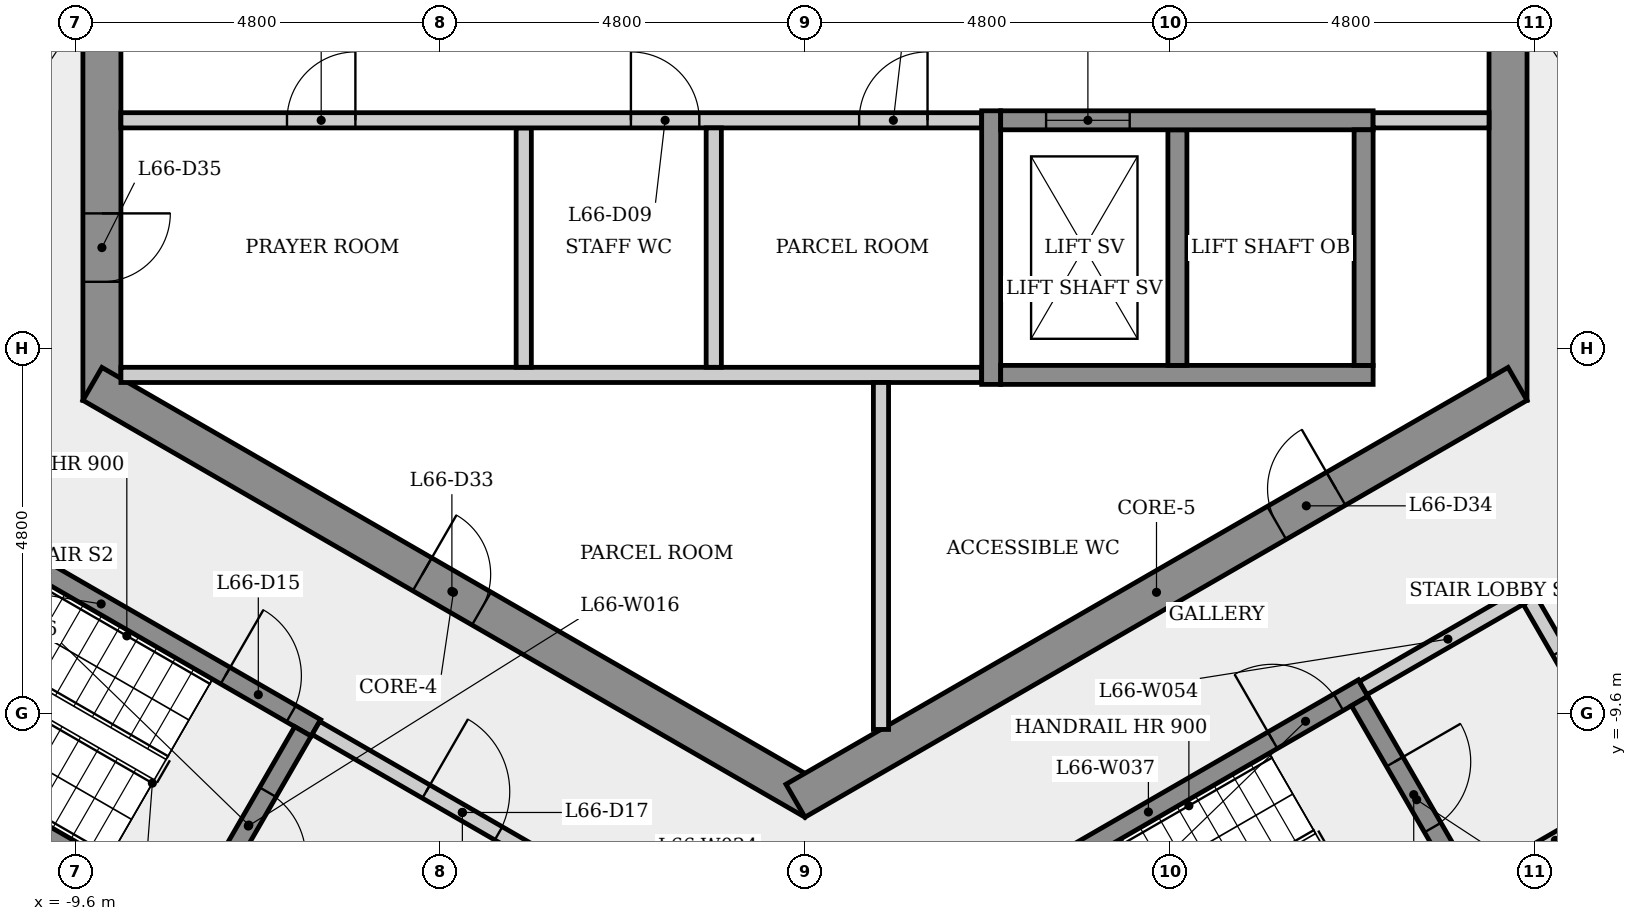
"""IFC4 building model, lengths in metres.
Left out: names, types, materials, properties, quantities, classifications, styles, units other than length and angle.
Written with IfcOpenShell. Run it as: python <this file> out.ifc"""

import sys

from ifc_helpers import new_model, si_unit, direction, frame, frame_2d, origin, place, context, subcontext, project, spatial, rectangle, extrude, element, fill, save


model = new_model("IFC4")
c1 = context("Model", 3, precision=1e-05, world=origin(), true_north=direction((0.0, 1.0)))
c2 = subcontext(c1, "Body", "Model", "MODEL_VIEW")
j1 = project(units=[si_unit("LENGTHUNIT", "METRE"), si_unit("PLANEANGLEUNIT", "RADIAN")], contexts=[c1])
p1 = place(None, origin())
s1 = spatial("IfcSite", under=j1, at=p1, CompositionType="ELEMENT")
p2 = place(p1, origin())
s2 = spatial("IfcBuilding", under=s1, at=p2, CompositionType="ELEMENT")
p3 = place(p2, frame((0.0, 0.0, 246.1)))
s3 = spatial("IfcBuildingStorey", under=s2, at=p3, CompositionType="ELEMENT", Elevation=246.1)
p4 = place(p3, frame((9.25, -5.485, 0.0), z_axis=(0.0, 0.0, 1.0), x_axis=(0.0, 1.0, 0.0)))
e1 = element("IfcWall", 1, at=p4, inside=s3, PredefinedType="SHEAR", context=c2, shape_type="SweptSolid", body=[
    extrude(rectangle(XDim=10.97, YDim=0.5, at=frame_2d((5.485, 0.0))), origin(), (0.0, 0.0, 1.0), 3.4),
])
p5 = place(p4, frame((4.685, 0.0, 0.0)))
e2 = element("IfcOpeningElement", 2, at=p5, cuts=e1, PredefinedType="OPENING", context=c2, shape_type="SweptSolid", body=[
    extrude(rectangle(XDim=1.6, YDim=2.1, at=frame_2d((0.8, 1.05))), frame((0.0, 0.26, 0.0), z_axis=(0.0, -1.0, 0.0), x_axis=(1.0, 0.0, 0.0)), (0.0, 0.0, 1.0), 0.52),
])
p6 = place(p3, frame((-9.25, 5.485, 0.0), z_axis=(0.0, 0.0, 1.0), x_axis=(0.0, -1.0, 0.0)))
e3 = element("IfcWall", 3, at=p6, inside=s3, PredefinedType="SHEAR", context=c2, shape_type="SweptSolid", body=[
    extrude(rectangle(XDim=10.97, YDim=0.5, at=frame_2d((5.485, 0.0))), origin(), (0.0, 0.0, 1.0), 3.4),
])
p7 = place(p6, frame((8.51, 0.0, 0.0)))
e4 = element("IfcOpeningElement", 4, at=p7, cuts=e3, PredefinedType="OPENING", context=c2, shape_type="SweptSolid", body=[
    extrude(rectangle(XDim=0.9, YDim=2.1, at=frame_2d((0.45, 1.05))), frame((0.0, 0.26, 0.0), z_axis=(0.0, -1.0, 0.0), x_axis=(1.0, 0.0, 0.0)), (0.0, 0.0, 1.0), 0.52),
])
p8 = place(p6, frame((4.685, 0.0, 0.0)))
e5 = element("IfcOpeningElement", 5, at=p8, cuts=e3, PredefinedType="OPENING", context=c2, shape_type="SweptSolid", body=[
    extrude(rectangle(XDim=1.6, YDim=2.1, at=frame_2d((0.8, 1.05))), frame((0.0, 0.26, 0.0), z_axis=(0.0, -1.0, 0.0), x_axis=(1.0, 0.0, 0.0)), (0.0, 0.0, 1.0), 0.52),
])
p9 = place(p3, frame((-9.375, -5.268, 0.0), z_axis=(0.0, 0.0, 1.0), x_axis=(0.866023993627, -0.500002442456, 0.0)))
e6 = element("IfcWall", 6, at=p9, inside=s3, PredefinedType="SHEAR", context=c2, shape_type="SweptSolid", body=[
    extrude(rectangle(XDim=10.97, YDim=0.5, at=frame_2d((5.485, 0.0))), origin(), (0.0, 0.0, 1.0), 3.4),
])
p10 = place(p9, frame((5.011, 0.0, 0.0)))
e7 = element("IfcOpeningElement", 7, at=p10, cuts=e6, PredefinedType="OPENING", context=c2, shape_type="SweptSolid", body=[
    extrude(rectangle(XDim=0.9, YDim=2.1, at=frame_2d((0.45, 1.05))), frame((0.0, 0.26, 0.0), z_axis=(0.0, -1.0, 0.0), x_axis=(1.0, 0.0, 0.0)), (0.0, 0.0, 1.0), 0.52),
])
p11 = place(p3, frame((-0.125, -10.753, 0.0), z_axis=(0.0, 0.0, 1.0), x_axis=(0.866023993627, 0.500002442456, 0.0)))
e8 = element("IfcWall", 8, at=p11, inside=s3, PredefinedType="SHEAR", context=c2, shape_type="SweptSolid", body=[
    extrude(rectangle(XDim=10.97, YDim=0.5, at=frame_2d((5.485, 0.0))), origin(), (0.0, 0.0, 1.0), 3.4),
])
p12 = place(p11, frame((7.311, 0.0, 0.0)))
e9 = element("IfcOpeningElement", 9, at=p12, cuts=e8, PredefinedType="OPENING", context=c2, shape_type="SweptSolid", body=[
    extrude(rectangle(XDim=0.9, YDim=2.1, at=frame_2d((0.45, 1.05))), frame((0.0, 0.26, 0.0), z_axis=(0.0, -1.0, 0.0), x_axis=(1.0, 0.0, 0.0)), (0.0, 0.0, 1.0), 0.52),
])
p13 = place(p3, frame((-12.085, -6.532, 0.0), z_axis=(0.0, 0.0, 1.0), x_axis=(0.866031063448, -0.499990197047, 0.0)))
e10 = element("IfcWall", 10, at=p13, inside=s3, PredefinedType="SHEAR", context=c2, shape_type="SweptSolid", body=[
    extrude(rectangle(XDim=6.525, YDim=0.25, at=frame_2d((3.263, 0.0))), origin(), (0.0, 0.0, 1.0), 3.05),
])
p14 = place(p13, frame((5.15, 0.0, 0.0)))
e11 = element("IfcOpeningElement", 11, at=p14, cuts=e10, PredefinedType="OPENING", context=c2, shape_type="SweptSolid", body=[
    extrude(rectangle(XDim=1.0, YDim=2.1, at=frame_2d((0.5, 1.05))), frame((0.0, 0.135, 0.0), z_axis=(0.0, -1.0, 0.0), x_axis=(1.0, 0.0, 0.0)), (0.0, 0.0, 1.0), 0.27),
])
p15 = place(p3, frame((-9.0, -5.15, 0.0), z_axis=(0.0, 0.0, 1.0), x_axis=(1.0, 0.0, 0.0)))
e12 = element("IfcWall", 12, at=p15, inside=s3, PredefinedType="PARTITIONING", context=c2, shape_type="SweptSolid", body=[
    extrude(rectangle(XDim=11.325, YDim=0.2, at=frame_2d((5.663, 0.0))), origin(), (0.0, 0.0, 1.0), 3.05),
])
p16 = place(p3, frame((-8.06, -12.321, 0.0), z_axis=(0.0, 0.0, 1.0), x_axis=(-0.866029591389, 0.499992746786, 0.0)))
e13 = element("IfcWall", 13, at=p16, inside=s3, PredefinedType="SHEAR", context=c2, shape_type="SweptSolid", body=[
    extrude(rectangle(XDim=6.255, YDim=0.25, at=frame_2d((3.127, 0.0))), origin(), (0.0, 0.0, 1.0), 3.05),
])
p17 = place(p3, frame((-6.605, -9.841, 0.0), z_axis=(0.0, 0.0, 1.0), x_axis=(-0.500011588718, -0.866018712932, 0.0)))
e14 = element("IfcWall", 14, at=p17, inside=s3, PredefinedType="SHEAR", context=c2, shape_type="SweptSolid", body=[
    extrude(rectangle(XDim=2.875, YDim=0.25, at=frame_2d((1.438, 0.0))), origin(), (0.0, 0.0, 1.0), 3.05),
])
p18 = place(p17, frame((0.923, 0.0, 0.0)))
e15 = element("IfcOpeningElement", 15, at=p18, cuts=e14, PredefinedType="OPENING", context=c2, shape_type="SweptSolid", body=[
    extrude(rectangle(XDim=1.0, YDim=2.1, at=frame_2d((0.5, 1.05))), frame((0.0, 0.135, 0.0), z_axis=(0.0, -1.0, 0.0), x_axis=(1.0, 0.0, 0.0)), (0.0, 0.0, 1.0), 0.27),
])
p19 = place(p3, frame((-6.435, -9.795, 0.0), z_axis=(0.0, 0.0, 1.0), x_axis=(0.866012907634, -0.500021643343, 0.0)))
e16 = element("IfcWall", 16, at=p19, inside=s3, PredefinedType="PARTITIONING", context=c2, shape_type="SweptSolid", body=[
    extrude(rectangle(XDim=4.45, YDim=0.2, at=frame_2d((2.225, 0.0))), origin(), (0.0, 0.0, 1.0), 3.05),
])
p20 = place(p19, frame((1.675, 0.0, 0.0)))
e17 = element("IfcOpeningElement", 17, at=p20, cuts=e16, PredefinedType="OPENING", context=c2, shape_type="SweptSolid", body=[
    extrude(rectangle(XDim=1.1, YDim=2.1, at=frame_2d((0.55, 1.05))), frame((0.0, 0.11, 0.0), z_axis=(0.0, -1.0, 0.0), x_axis=(1.0, 0.0, 0.0)), (0.0, 0.0, 1.0), 0.22),
])
p21 = place(p3, frame((-3.7, -1.9, 0.0), z_axis=(0.0, 0.0, 1.0), x_axis=(0.0, -1.0, 0.0)))
e18 = element("IfcWall", 18, at=p21, inside=s3, PredefinedType="PARTITIONING", context=c2, shape_type="SweptSolid", body=[
    extrude(rectangle(XDim=3.15, YDim=0.2, at=frame_2d((1.575, 0.0))), origin(), (0.0, 0.0, 1.0), 3.05),
])
p22 = place(p3, frame((-9.0, -1.8, 0.0), z_axis=(0.0, 0.0, 1.0), x_axis=(1.0, 0.0, 0.0)))
e19 = element("IfcWall", 19, at=p22, inside=s3, PredefinedType="PARTITIONING", context=c2, shape_type="SweptSolid", body=[
    extrude(rectangle(XDim=11.325, YDim=0.2, at=frame_2d((5.663, 0.0))), origin(), (0.0, 0.0, 1.0), 3.05),
])
p23 = place(p22, frame((2.185, 0.0, 0.0)))
e20 = element("IfcOpeningElement", 20, at=p23, cuts=e19, PredefinedType="OPENING", context=c2, shape_type="SweptSolid", body=[
    extrude(rectangle(XDim=0.9, YDim=2.1, at=frame_2d((0.45, 1.05))), frame((0.0, 0.11, 0.0), z_axis=(0.0, -1.0, 0.0), x_axis=(1.0, 0.0, 0.0)), (0.0, 0.0, 1.0), 0.22),
])
p24 = place(p22, frame((6.71, 0.0, 0.0)))
e21 = element("IfcOpeningElement", 21, at=p24, cuts=e19, PredefinedType="OPENING", context=c2, shape_type="SweptSolid", body=[
    extrude(rectangle(XDim=0.9, YDim=2.1, at=frame_2d((0.45, 1.05))), frame((0.0, 0.11, 0.0), z_axis=(0.0, -1.0, 0.0), x_axis=(1.0, 0.0, 0.0)), (0.0, 0.0, 1.0), 0.22),
])
p25 = place(p22, frame((9.713, 0.0, 0.0)))
e22 = element("IfcOpeningElement", 22, at=p25, cuts=e19, PredefinedType="OPENING", context=c2, shape_type="SweptSolid", body=[
    extrude(rectangle(XDim=0.9, YDim=2.1, at=frame_2d((0.45, 1.05))), frame((0.0, 0.11, 0.0), z_axis=(0.0, -1.0, 0.0), x_axis=(1.0, 0.0, 0.0)), (0.0, 0.0, 1.0), 0.22),
])
p26 = place(p3, frame((-1.2, -1.9, 0.0), z_axis=(0.0, 0.0, 1.0), x_axis=(0.0, -1.0, 0.0)))
e23 = element("IfcWall", 23, at=p26, inside=s3, PredefinedType="PARTITIONING", context=c2, shape_type="SweptSolid", body=[
    extrude(rectangle(XDim=3.15, YDim=0.2, at=frame_2d((1.575, 0.0))), origin(), (0.0, 0.0, 1.0), 3.05),
])
p27 = place(p3, frame((1.0, -5.25, 0.0), z_axis=(0.0, 0.0, 1.0), x_axis=(0.0, -1.0, 0.0)))
e24 = element("IfcWall", 24, at=p27, inside=s3, PredefinedType="PARTITIONING", context=c2, shape_type="SweptSolid", body=[
    extrude(rectangle(XDim=4.565, YDim=0.2, at=frame_2d((2.282, 0.0))), origin(), (0.0, 0.0, 1.0), 3.05),
])
p28 = place(p3, frame((1.693, -12.532, 0.0), z_axis=(0.0, 0.0, 1.0), x_axis=(0.866031063448, 0.499990197047, 0.0)))
e25 = element("IfcWall", 25, at=p28, inside=s3, PredefinedType="SHEAR", context=c2, shape_type="SweptSolid", body=[
    extrude(rectangle(XDim=6.525, YDim=0.25, at=frame_2d((3.263, 0.0))), origin(), (0.0, 0.0, 1.0), 3.05),
])
p29 = place(p28, frame((5.15, 0.0, 0.0)))
e26 = element("IfcOpeningElement", 26, at=p29, cuts=e25, PredefinedType="OPENING", context=c2, shape_type="SweptSolid", body=[
    extrude(rectangle(XDim=1.0, YDim=2.1, at=frame_2d((0.5, 1.05))), frame((0.0, 0.135, 0.0), z_axis=(0.0, -1.0, 0.0), x_axis=(1.0, 0.0, 0.0)), (0.0, 0.0, 1.0), 0.27),
])
p30 = place(p3, frame((2.45, -5.275, 0.0), z_axis=(0.0, 0.0, 1.0), x_axis=(0.0, 1.0, 0.0)))
e27 = element("IfcWall", 27, at=p30, inside=s3, PredefinedType="SHEAR", context=c2, shape_type="SweptSolid", body=[
    extrude(rectangle(XDim=3.6, YDim=0.25, at=frame_2d((1.8, 0.0))), origin(), (0.0, 0.0, 1.0), 3.05),
])
p31 = place(p3, frame((2.575, -5.15, 0.0), z_axis=(0.0, 0.0, 1.0), x_axis=(1.0, 0.0, 0.0)))
e28 = element("IfcWall", 28, at=p31, inside=s3, PredefinedType="SHEAR", context=c2, shape_type="SweptSolid", body=[
    extrude(rectangle(XDim=4.9, YDim=0.25, at=frame_2d((2.45, 0.0))), origin(), (0.0, 0.0, 1.0), 3.05),
])
p32 = place(p3, frame((4.9, -1.925, 0.0), z_axis=(0.0, 0.0, 1.0), x_axis=(0.0, -1.0, 0.0)))
e29 = element("IfcWall", 29, at=p32, inside=s3, PredefinedType="SHEAR", context=c2, shape_type="SweptSolid", body=[
    extrude(rectangle(XDim=3.1, YDim=0.25, at=frame_2d((1.55, 0.0))), origin(), (0.0, 0.0, 1.0), 3.4),
])
p33 = place(p3, frame((2.575, -1.8, 0.0), z_axis=(0.0, 0.0, 1.0), x_axis=(1.0, 0.0, 0.0)))
e30 = element("IfcWall", 30, at=p33, inside=s3, PredefinedType="SHEAR", context=c2, shape_type="SweptSolid", body=[
    extrude(rectangle(XDim=4.9, YDim=0.25, at=frame_2d((2.45, 0.0))), origin(), (0.0, 0.0, 1.0), 3.05),
])
p34 = place(p33, frame((0.597, 0.0, 0.0)))
e31 = element("IfcOpeningElement", 31, at=p34, cuts=e30, PredefinedType="OPENING", context=c2, shape_type="SweptSolid", body=[
    extrude(rectangle(XDim=1.1, YDim=2.1, at=frame_2d((0.55, 1.05))), frame((0.0, 0.135, 0.0), z_axis=(0.0, -1.0, 0.0), x_axis=(1.0, 0.0, 0.0)), (0.0, 0.0, 1.0), 0.27),
])
p35 = place(p3, frame((7.298, -9.441, 0.0), z_axis=(0.0, 0.0, 1.0), x_axis=(0.50002537861, -0.866010750942, 0.0)))
e32 = element("IfcWall", 32, at=p35, inside=s3, PredefinedType="SHEAR", context=c2, shape_type="SweptSolid", body=[
    extrude(rectangle(XDim=3.0, YDim=0.25, at=frame_2d((1.5, 0.0))), origin(), (0.0, 0.0, 1.0), 3.05),
])
p36 = place(p35, frame((0.923, 0.0, 0.0)))
e33 = element("IfcOpeningElement", 33, at=p36, cuts=e32, PredefinedType="OPENING", context=c2, shape_type="SweptSolid", body=[
    extrude(rectangle(XDim=1.0, YDim=2.1, at=frame_2d((0.5, 1.05))), frame((0.0, 0.135, 0.0), z_axis=(0.0, -1.0, 0.0), x_axis=(1.0, 0.0, 0.0)), (0.0, 0.0, 1.0), 0.27),
])
p37 = place(p3, frame((7.344, -9.27, 0.0), z_axis=(0.0, 0.0, 1.0), x_axis=(0.866005588531, 0.500034319456, 0.0)))
e34 = element("IfcWall", 34, at=p37, inside=s3, PredefinedType="PARTITIONING", context=c2, shape_type="SweptSolid", body=[
    extrude(rectangle(XDim=2.575, YDim=0.2, at=frame_2d((1.288, 0.0))), origin(), (0.0, 0.0, 1.0), 3.05),
])
p38 = place(p3, frame((7.35, -1.925, 0.0), z_axis=(0.0, 0.0, 1.0), x_axis=(0.0, -1.0, 0.0)))
e35 = element("IfcWall", 35, at=p38, inside=s3, PredefinedType="SHEAR", context=c2, shape_type="SweptSolid", body=[
    extrude(rectangle(XDim=3.1, YDim=0.25, at=frame_2d((1.55, 0.0))), origin(), (0.0, 0.0, 1.0), 3.4),
])
p39 = place(p3, frame((9.0, -1.8, 0.0), z_axis=(0.0, 0.0, 1.0), x_axis=(-1.0, 0.0, 0.0)))
e36 = element("IfcWall", 36, at=p39, inside=s3, PredefinedType="PARTITIONING", context=c2, shape_type="SweptSolid", body=[
    extrude(rectangle(XDim=1.525, YDim=0.2, at=frame_2d((0.763, 0.0))), origin(), (0.0, 0.0, 1.0), 3.05),
])
p40 = place(p3, frame((9.537, -8.119, 0.0), z_axis=(0.0, 0.0, 1.0), x_axis=(0.499990139034, -0.866031096941, 0.0)))
e37 = element("IfcWall", 37, at=p40, inside=s3, PredefinedType="PARTITIONING", context=c2, shape_type="SweptSolid", body=[
    extrude(rectangle(XDim=3.0, YDim=0.2, at=frame_2d((1.5, 0.0))), origin(), (0.0, 0.0, 1.0), 3.05),
])
p41 = place(p40, frame((0.778, 0.0, 0.0)))
e38 = element("IfcOpeningElement", 38, at=p41, cuts=e37, PredefinedType="OPENING", context=c2, shape_type="SweptSolid", body=[
    extrude(rectangle(XDim=1.0, YDim=2.1, at=frame_2d((0.5, 1.05))), frame((0.0, 0.11, 0.0), z_axis=(0.0, -1.0, 0.0), x_axis=(1.0, 0.0, 0.0)), (0.0, 0.0, 1.0), 0.22),
])
p42 = place(p3, frame((10.901, -10.681, 0.0), z_axis=(0.0, 0.0, 1.0), x_axis=(-0.866007538022, -0.500030943131, 0.0)))
e39 = element("IfcWall", 39, at=p42, inside=s3, PredefinedType="PARTITIONING", context=c2, shape_type="SweptSolid", body=[
    extrude(rectangle(XDim=2.375, YDim=0.2, at=frame_2d((1.188, 0.0))), origin(), (0.0, 0.0, 1.0), 3.05),
])
p43 = place(p34, origin())
e40 = element("IfcDoor", 40, at=p43, inside=s3, OperationType="SLIDING_TO_LEFT", PredefinedType="DOOR", context=c2, shape_type="SweptSolid", body=[
    extrude(rectangle(XDim=1.1, YDim=2.1, at=frame_2d((0.55, 1.05))), frame((0.0, 0.025, 0.0), z_axis=(0.0, -1.0, 0.0), x_axis=(1.0, 0.0, 0.0)), (0.0, 0.0, 1.0), 0.05),
])
fill(e31, e40)
p44 = place(p23, origin())
e41 = element("IfcDoor", 41, at=p44, inside=s3, OperationType="SINGLE_SWING_RIGHT", PredefinedType="DOOR", context=c2, shape_type="SweptSolid", body=[
    extrude(rectangle(XDim=0.9, YDim=2.1, at=frame_2d((0.45, 1.05))), frame((0.0, 0.025, 0.0), z_axis=(0.0, -1.0, 0.0), x_axis=(1.0, 0.0, 0.0)), (0.0, 0.0, 1.0), 0.05),
])
fill(e20, e41)
p45 = place(p24, origin())
e42 = element("IfcDoor", 42, at=p45, inside=s3, OperationType="SINGLE_SWING_LEFT", PredefinedType="DOOR", context=c2, shape_type="SweptSolid", body=[
    extrude(rectangle(XDim=0.9, YDim=2.1, at=frame_2d((0.45, 1.05))), frame((0.0, 0.025, 0.0), z_axis=(0.0, -1.0, 0.0), x_axis=(1.0, 0.0, 0.0)), (0.0, 0.0, 1.0), 0.05),
])
fill(e21, e42)
p46 = place(p25, origin())
e43 = element("IfcDoor", 43, at=p46, inside=s3, OperationType="SINGLE_SWING_RIGHT", PredefinedType="DOOR", context=c2, shape_type="SweptSolid", body=[
    extrude(rectangle(XDim=0.9, YDim=2.1, at=frame_2d((0.45, 1.05))), frame((0.0, 0.025, 0.0), z_axis=(0.0, -1.0, 0.0), x_axis=(1.0, 0.0, 0.0)), (0.0, 0.0, 1.0), 0.05),
])
fill(e22, e43)
p47 = place(p14, origin())
e44 = element("IfcDoor", 44, at=p47, inside=s3, OperationType="SINGLE_SWING_LEFT", PredefinedType="DOOR", context=c2, shape_type="SweptSolid", body=[
    extrude(rectangle(XDim=1.0, YDim=2.1, at=frame_2d((0.5, 1.05))), frame((0.0, 0.025, 0.0), z_axis=(0.0, -1.0, 0.0), x_axis=(1.0, 0.0, 0.0)), (0.0, 0.0, 1.0), 0.05),
])
fill(e11, e44)
p48 = place(p18, origin())
e45 = element("IfcDoor", 45, at=p48, inside=s3, OperationType="SINGLE_SWING_RIGHT", PredefinedType="DOOR", context=c2, shape_type="SweptSolid", body=[
    extrude(rectangle(XDim=1.0, YDim=2.1, at=frame_2d((0.5, 1.05))), frame((0.0, 0.025, 0.0), z_axis=(0.0, -1.0, 0.0), x_axis=(1.0, 0.0, 0.0)), (0.0, 0.0, 1.0), 0.05),
])
fill(e15, e45)
p49 = place(p20, origin())
e46 = element("IfcDoor", 46, at=p49, inside=s3, OperationType="SINGLE_SWING_LEFT", PredefinedType="DOOR", context=c2, shape_type="SweptSolid", body=[
    extrude(rectangle(XDim=1.1, YDim=2.1, at=frame_2d((0.55, 1.05))), frame((0.0, 0.025, 0.0), z_axis=(0.0, -1.0, 0.0), x_axis=(1.0, 0.0, 0.0)), (0.0, 0.0, 1.0), 0.05),
])
fill(e17, e46)
p50 = place(p29, origin())
e47 = element("IfcDoor", 47, at=p50, inside=s3, OperationType="SINGLE_SWING_LEFT", PredefinedType="DOOR", context=c2, shape_type="SweptSolid", body=[
    extrude(rectangle(XDim=1.0, YDim=2.1, at=frame_2d((0.5, 1.05))), frame((0.0, 0.025, 0.0), z_axis=(0.0, -1.0, 0.0), x_axis=(1.0, 0.0, 0.0)), (0.0, 0.0, 1.0), 0.05),
])
fill(e26, e47)
p51 = place(p36, origin())
e48 = element("IfcDoor", 48, at=p51, inside=s3, OperationType="SINGLE_SWING_LEFT", PredefinedType="DOOR", context=c2, shape_type="SweptSolid", body=[
    extrude(rectangle(XDim=1.0, YDim=2.1, at=frame_2d((0.5, 1.05))), frame((0.0, 0.025, 0.0), z_axis=(0.0, -1.0, 0.0), x_axis=(1.0, 0.0, 0.0)), (0.0, 0.0, 1.0), 0.05),
])
fill(e33, e48)
p52 = place(p10, origin())
e49 = element("IfcDoor", 49, at=p52, inside=s3, OperationType="SINGLE_SWING_LEFT", PredefinedType="DOOR", context=c2, shape_type="SweptSolid", body=[
    extrude(rectangle(XDim=0.9, YDim=2.1, at=frame_2d((0.45, 1.05))), frame((0.0, 0.025, 0.0), z_axis=(0.0, -1.0, 0.0), x_axis=(1.0, 0.0, 0.0)), (0.0, 0.0, 1.0), 0.05),
])
fill(e7, e49)
p53 = place(p12, origin())
e50 = element("IfcDoor", 50, at=p53, inside=s3, OperationType="SINGLE_SWING_RIGHT", PredefinedType="DOOR", context=c2, shape_type="SweptSolid", body=[
    extrude(rectangle(XDim=0.9, YDim=2.1, at=frame_2d((0.45, 1.05))), frame((0.0, 0.025, 0.0), z_axis=(0.0, -1.0, 0.0), x_axis=(1.0, 0.0, 0.0)), (0.0, 0.0, 1.0), 0.05),
])
fill(e9, e50)
p54 = place(p7, origin())
e51 = element("IfcDoor", 51, at=p54, inside=s3, OperationType="SINGLE_SWING_LEFT", PredefinedType="DOOR", context=c2, shape_type="SweptSolid", body=[
    extrude(rectangle(XDim=0.9, YDim=2.1, at=frame_2d((0.45, 1.05))), frame((0.0, 0.025, 0.0), z_axis=(0.0, -1.0, 0.0), x_axis=(1.0, 0.0, 0.0)), (0.0, 0.0, 1.0), 0.05),
])
fill(e4, e51)
save(model, sys.argv[1])
